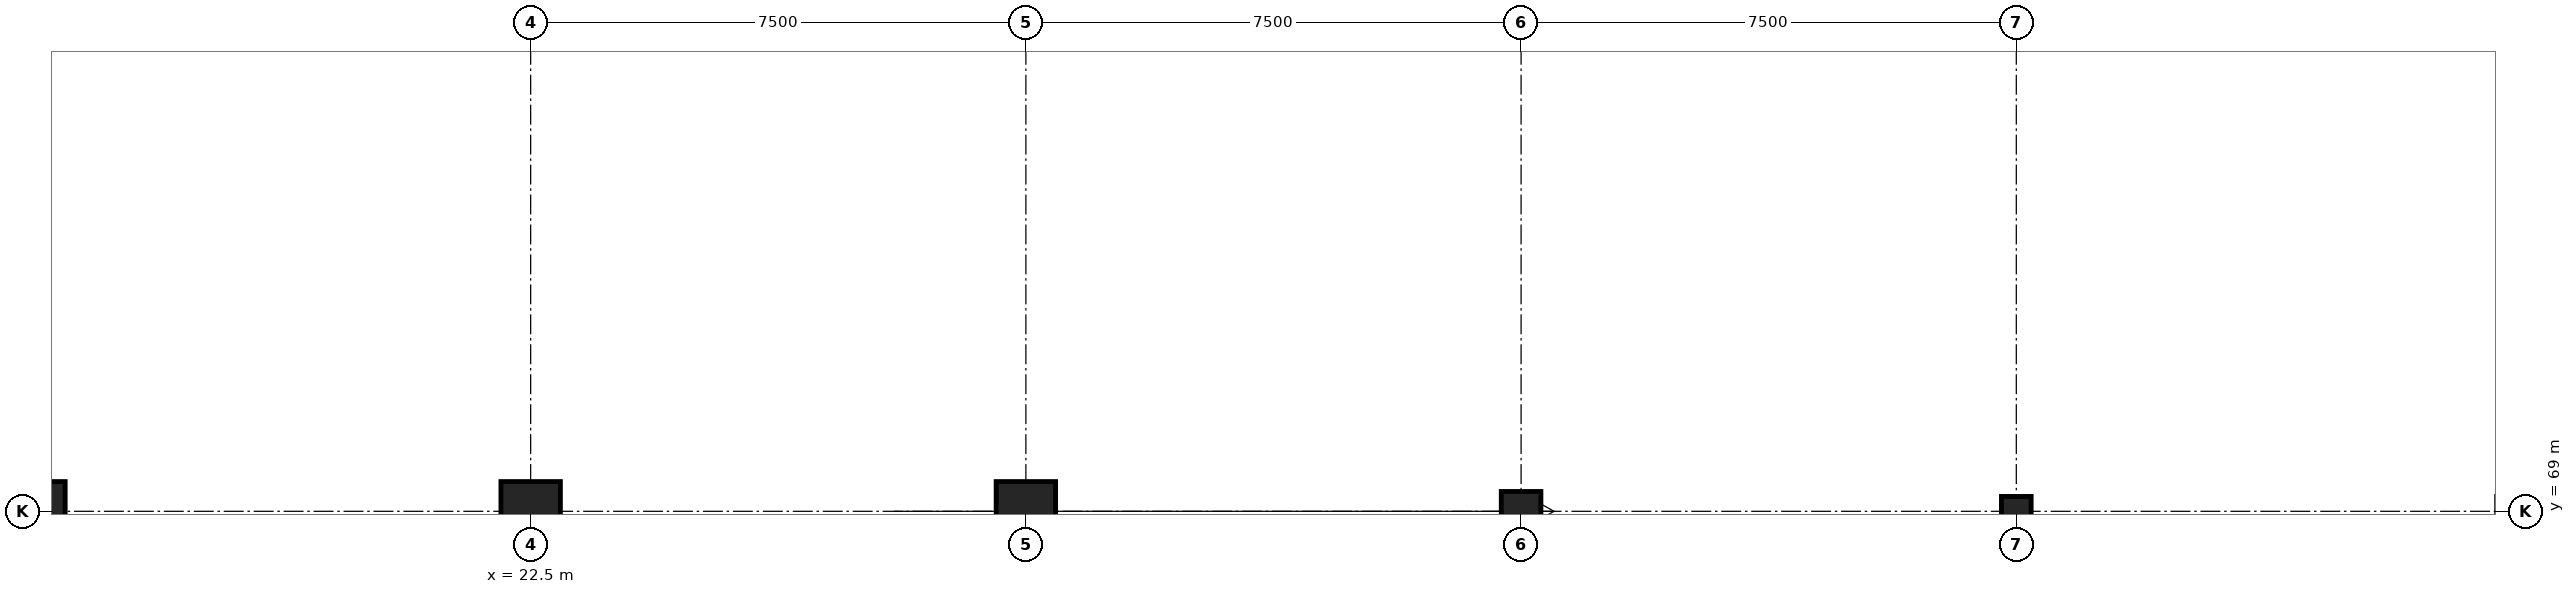
"""IFC4 building model, lengths in metres.
Left out: names, types, materials, properties, quantities, classifications, styles, units other than length and angle.
Written with IfcOpenShell. Run it as: python <this file> out.ifc"""

import sys

from ifc_helpers import new_model, si_unit, direction, frame, origin, origin_2d, place, context, subcontext, project, spatial, rectangle, circle, extrude, element, save


model = new_model("IFC4")
c1 = context("Model", 3, precision=1e-05, world=origin(), true_north=direction((0.0, 1.0)))
c2 = subcontext(c1, "Body", "Model", "MODEL_VIEW")
j1 = project(units=[si_unit("LENGTHUNIT", "METRE"), si_unit("PLANEANGLEUNIT", "RADIAN")], contexts=[c1])
p1 = place(None, origin())
s1 = spatial("IfcSite", under=j1, at=p1, CompositionType="ELEMENT")
p2 = place(p1, origin())
s2 = spatial("IfcBuilding", under=s1, at=p2, CompositionType="ELEMENT")
p3 = place(p2, frame((0.0, 0.0, -4.5)))
s3 = spatial("IfcBuildingStorey", under=s2, at=p3, CompositionType="ELEMENT", Elevation=-4.5)
p4 = place(p3, frame((15.0, 69.0, 0.0), z_axis=(0.0, 0.0, 1.0), x_axis=(1.0, 0.0, 0.0)))
e1 = element("IfcColumn", 1, at=p4, inside=s3, PredefinedType="COLUMN", context=c2, shape_type="SweptSolid", body=[
    extrude(rectangle(XDim=0.9, YDim=0.9, at=origin_2d()), origin(), (0.0, 0.0, 1.0), 4.5),
])
p5 = place(p3, frame((22.5, 69.0, 0.0), z_axis=(0.0, 0.0, 1.0), x_axis=(1.0, 0.0, 0.0)))
e2 = element("IfcColumn", 2, at=p5, inside=s3, PredefinedType="COLUMN", context=c2, shape_type="SweptSolid", body=[
    extrude(circle(Radius=0.45, at=origin_2d()), origin(), (0.0, 0.0, 1.0), 4.5),
])
p6 = place(p3, frame((30.0, 69.0, 0.0), z_axis=(0.0, 0.0, 1.0), x_axis=(1.0, 0.0, 0.0)))
e3 = element("IfcColumn", 3, at=p6, inside=s3, PredefinedType="COLUMN", context=c2, shape_type="SweptSolid", body=[
    extrude(rectangle(XDim=0.9, YDim=0.9, at=origin_2d()), origin(), (0.0, 0.0, 1.0), 4.5),
])
p7 = place(p3, frame((37.5, 69.0, 0.0), z_axis=(0.0, 0.0, 1.0), x_axis=(1.0, 0.0, 0.0)))
e4 = element("IfcColumn", 4, at=p7, inside=s3, PredefinedType="COLUMN", context=c2, shape_type="SweptSolid", body=[
    extrude(rectangle(XDim=0.6, YDim=0.6, at=origin_2d()), origin(), (0.0, 0.0, 1.0), 4.5),
])
p8 = place(p3, frame((45.0, 69.0, 0.0), z_axis=(0.0, 0.0, 1.0), x_axis=(1.0, 0.0, 0.0)))
e5 = element("IfcColumn", 5, at=p8, inside=s3, PredefinedType="COLUMN", context=c2, shape_type="SweptSolid", body=[
    extrude(rectangle(XDim=0.45, YDim=0.45, at=origin_2d()), origin(), (0.0, 0.0, 1.0), 4.5),
])
save(model, sys.argv[1])
